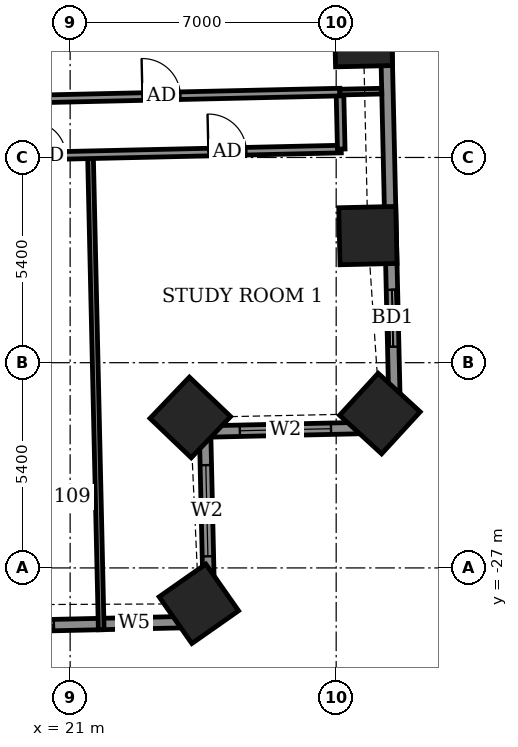
"""IFC4 building model, lengths in metres.
Left out: names, types, materials, properties, quantities, classifications, styles, units other than length and angle.
Written with IfcOpenShell. Run it as: python <this file> out.ifc"""

import sys

from ifc_helpers import new_model, si_unit, direction, frame, frame_2d, origin, origin_2d, place, context, subcontext, project, spatial, rectangle, extrude, element, fill, save


model = new_model("IFC4")
c1 = context("Model", 3, precision=1e-05, world=origin(), true_north=direction((0.0, 1.0)))
c2 = subcontext(c1, "Body", "Model", "MODEL_VIEW")
j1 = project(units=[si_unit("LENGTHUNIT", "METRE"), si_unit("PLANEANGLEUNIT", "RADIAN")], contexts=[c1])
p1 = place(None, origin())
s1 = spatial("IfcSite", under=j1, at=p1, CompositionType="ELEMENT")
p2 = place(p1, origin())
s2 = spatial("IfcBuilding", under=s1, at=p2, CompositionType="ELEMENT")
p3 = place(p2, frame((0.0, 0.0, 48.5)))
s3 = spatial("IfcBuildingStorey", under=s2, at=p3, CompositionType="ELEMENT", Elevation=48.5)
for number, where, z_axis, x_axis in (
    (1, (24.386, -27.944, -0.55), (0.0, 0.0, 1.0), (0.819, 0.574, 0.0)),
    (2, (24.162, -23.041, -0.55), (0.0, 0.0, 1.0), (0.691, 0.723, 0.0)),
    (3, (29.15, -22.938, -0.55), (0.0, 0.0, 1.0), (0.676, 0.737, 0.0)),
    (4, (28.834, -18.256, -0.55), (0.0, 0.0, 1.0), (-0.023, 1.0, 0.0)),
    (5, (28.716, -13.049, -0.55), (0.0, 0.0, 1.0), (-0.023, 1.0, 0.0)),
):
    element("IfcColumn", number, at=place(p3, frame(where, z_axis=z_axis, x_axis=x_axis)), inside=s3, PredefinedType="COLUMN", context=c2, shape_type="SweptSolid", body=[
        extrude(rectangle(XDim=1.5, YDim=1.5, at=origin_2d()), origin(), (0.0, 0.0, 1.0), 3.6),
    ])
p4 = place(p3, frame((29.549, -23.299, 0.0), z_axis=(0.0, 0.0, 1.0), x_axis=(-0.022670336976, 0.999742994885, 0.0)))
e6 = element("IfcWall", 6, at=p4, inside=s3, PredefinedType="SOLIDWALL", context=c2, shape_type="SweptSolid", body=[
    extrude(rectangle(XDim=15.529, YDim=0.3, at=frame_2d((7.765, 0.0))), origin(), (0.0, 0.0, 1.0), 3.05),
])
p5 = place(p4, frame((2.119, 0.0, 0.0)))
e7 = element("IfcOpeningElement", 7, at=p5, cuts=e6, PredefinedType="OPENING", context=c2, shape_type="SweptSolid", body=[
    extrude(rectangle(XDim=1.5, YDim=2.4, at=frame_2d((0.75, 1.2))), frame((0.0, 0.16, 0.0), z_axis=(0.0, -1.0, 0.0), x_axis=(1.0, 0.0, 0.0)), (0.0, 0.0, 1.0), 0.32),
])
p6 = place(p4, frame((11.183, 0.0, 0.9)))
e8 = element("IfcOpeningElement", 8, at=p6, cuts=e6, PredefinedType="OPENING", context=c2, shape_type="SweptSolid", body=[
    extrude(rectangle(XDim=0.9, YDim=1.5, at=frame_2d((0.45, 0.75))), frame((0.0, 0.16, 0.0), z_axis=(0.0, -1.0, 0.0), x_axis=(1.0, 0.0, 0.0)), (0.0, 0.0, 1.0), 0.32),
])
p7 = place(p4, frame((13.087, 0.0, 0.9)))
e9 = element("IfcOpeningElement", 9, at=p7, cuts=e6, PredefinedType="OPENING", context=c2, shape_type="SweptSolid", body=[
    extrude(rectangle(XDim=1.2, YDim=1.5, at=frame_2d((0.6, 0.75))), frame((0.0, 0.16, 0.0), z_axis=(0.0, -1.0, 0.0), x_axis=(1.0, 0.0, 0.0)), (0.0, 0.0, 1.0), 0.32),
])
p8 = place(p3, frame((-27.423, -29.593, 0.0), z_axis=(0.0, 0.0, 1.0), x_axis=(0.999742563204, 0.022689365739, 0.0)))
e10 = element("IfcWall", 10, at=p8, inside=s3, PredefinedType="SOLIDWALL", context=c2, shape_type="SweptSolid", body=[
    extrude(rectangle(XDim=52.101, YDim=0.3, at=frame_2d((26.05, 0.0))), origin(), (0.0, 0.0, 1.0), 3.05),
])
p9 = place(p8, frame((3.162, 0.0, 0.0)))
e11 = element("IfcOpeningElement", 11, at=p9, cuts=e10, PredefinedType="OPENING", context=c2, shape_type="SweptSolid", body=[
    extrude(rectangle(XDim=1.5, YDim=2.4, at=frame_2d((0.75, 1.2))), frame((0.0, 0.16, 0.0), z_axis=(0.0, -1.0, 0.0), x_axis=(1.0, 0.0, 0.0)), (0.0, 0.0, 1.0), 0.32),
])
p10 = place(p8, frame((9.168, 0.0, 0.0)))
e12 = element("IfcOpeningElement", 12, at=p10, cuts=e10, PredefinedType="OPENING", context=c2, shape_type="SweptSolid", body=[
    extrude(rectangle(XDim=1.5, YDim=2.4, at=frame_2d((0.75, 1.2))), frame((0.0, 0.16, 0.0), z_axis=(0.0, -1.0, 0.0), x_axis=(1.0, 0.0, 0.0)), (0.0, 0.0, 1.0), 0.32),
])
p11 = place(p8, frame((12.411, 0.0, 0.0)))
e13 = element("IfcOpeningElement", 13, at=p11, cuts=e10, PredefinedType="OPENING", context=c2, shape_type="SweptSolid", body=[
    extrude(rectangle(XDim=1.5, YDim=2.4, at=frame_2d((0.75, 1.2))), frame((0.0, 0.16, 0.0), z_axis=(0.0, -1.0, 0.0), x_axis=(1.0, 0.0, 0.0)), (0.0, 0.0, 1.0), 0.32),
])
p12 = place(p8, frame((18.275, 0.0, 0.0)))
e14 = element("IfcOpeningElement", 14, at=p12, cuts=e10, PredefinedType="OPENING", context=c2, shape_type="SweptSolid", body=[
    extrude(rectangle(XDim=1.5, YDim=2.4, at=frame_2d((0.75, 1.2))), frame((0.0, 0.16, 0.0), z_axis=(0.0, -1.0, 0.0), x_axis=(1.0, 0.0, 0.0)), (0.0, 0.0, 1.0), 0.32),
])
p13 = place(p8, frame((23.603, 0.0, 0.0)))
e15 = element("IfcOpeningElement", 15, at=p13, cuts=e10, PredefinedType="OPENING", context=c2, shape_type="SweptSolid", body=[
    extrude(rectangle(XDim=1.5, YDim=2.4, at=frame_2d((0.75, 1.2))), frame((0.0, 0.16, 0.0), z_axis=(0.0, -1.0, 0.0), x_axis=(1.0, 0.0, 0.0)), (0.0, 0.0, 1.0), 0.32),
])
p14 = place(p8, frame((26.846, 0.0, 0.0)))
e16 = element("IfcOpeningElement", 16, at=p14, cuts=e10, PredefinedType="OPENING", context=c2, shape_type="SweptSolid", body=[
    extrude(rectangle(XDim=1.5, YDim=2.4, at=frame_2d((0.75, 1.2))), frame((0.0, 0.16, 0.0), z_axis=(0.0, -1.0, 0.0), x_axis=(1.0, 0.0, 0.0)), (0.0, 0.0, 1.0), 0.32),
])
p15 = place(p8, frame((31.975, 0.0, 0.0)))
e17 = element("IfcOpeningElement", 17, at=p15, cuts=e10, PredefinedType="OPENING", context=c2, shape_type="SweptSolid", body=[
    extrude(rectangle(XDim=1.5, YDim=2.4, at=frame_2d((0.75, 1.2))), frame((0.0, 0.16, 0.0), z_axis=(0.0, -1.0, 0.0), x_axis=(1.0, 0.0, 0.0)), (0.0, 0.0, 1.0), 0.32),
])
p16 = place(p8, frame((38.214, 0.0, 0.0)))
e18 = element("IfcOpeningElement", 18, at=p16, cuts=e10, PredefinedType="OPENING", context=c2, shape_type="SweptSolid", body=[
    extrude(rectangle(XDim=1.5, YDim=2.4, at=frame_2d((0.75, 1.2))), frame((0.0, 0.16, 0.0), z_axis=(0.0, -1.0, 0.0), x_axis=(1.0, 0.0, 0.0)), (0.0, 0.0, 1.0), 0.32),
])
p17 = place(p8, frame((41.457, 0.0, 0.0)))
e19 = element("IfcOpeningElement", 19, at=p17, cuts=e10, PredefinedType="OPENING", context=c2, shape_type="SweptSolid", body=[
    extrude(rectangle(XDim=1.5, YDim=2.4, at=frame_2d((0.75, 1.2))), frame((0.0, 0.16, 0.0), z_axis=(0.0, -1.0, 0.0), x_axis=(1.0, 0.0, 0.0)), (0.0, 0.0, 1.0), 0.32),
])
p18 = place(p8, frame((46.507, 0.0, 0.0)))
e20 = element("IfcOpeningElement", 20, at=p18, cuts=e10, PredefinedType="OPENING", context=c2, shape_type="SweptSolid", body=[
    extrude(rectangle(XDim=1.5, YDim=2.4, at=frame_2d((0.75, 1.2))), frame((0.0, 0.16, 0.0), z_axis=(0.0, -1.0, 0.0), x_axis=(1.0, 0.0, 0.0)), (0.0, 0.0, 1.0), 0.32),
])
p19 = place(p8, frame((49.671, 0.0, 0.9)))
e21 = element("IfcOpeningElement", 21, at=p19, cuts=e10, PredefinedType="OPENING", context=c2, shape_type="SweptSolid", body=[
    extrude(rectangle(XDim=0.9, YDim=1.5, at=frame_2d((0.45, 0.75))), frame((0.0, 0.16, 0.0), z_axis=(0.0, -1.0, 0.0), x_axis=(1.0, 0.0, 0.0)), (0.0, 0.0, 1.0), 0.32),
])
p20 = place(p3, frame((24.664, -28.411, 0.0), z_axis=(0.0, 0.0, 1.0), x_axis=(-0.022802372469, 0.999739992103, 0.0)))
e22 = element("IfcWall", 22, at=p20, inside=s3, PredefinedType="SOLIDWALL", context=c2, shape_type="SweptSolid", body=[
    extrude(rectangle(XDim=5.0, YDim=0.3, at=frame_2d((2.5, 0.0))), origin(), (0.0, 0.0, 1.0), 2.55),
])
p21 = place(p20, frame((1.717, 0.0, 0.9)))
e23 = element("IfcOpeningElement", 23, at=p21, cuts=e22, PredefinedType="OPENING", context=c2, shape_type="SweptSolid", body=[
    extrude(rectangle(XDim=2.4, YDim=1.5, at=frame_2d((1.2, 0.75))), frame((0.0, 0.16, 0.0), z_axis=(0.0, -1.0, 0.0), x_axis=(1.0, 0.0, 0.0)), (0.0, 0.0, 1.0), 0.32),
])
p22 = place(p3, frame((24.55, -23.412, 0.0), z_axis=(0.0, 0.0, 1.0), x_axis=(0.999744450377, 0.022606059803, 0.0)))
e24 = element("IfcWall", 24, at=p22, inside=s3, PredefinedType="SOLIDWALL", context=c2, shape_type="SweptSolid", body=[
    extrude(rectangle(XDim=5.0, YDim=0.3, at=frame_2d((2.5, 0.0))), origin(), (0.0, 0.0, 1.0), 3.05),
])
p23 = place(p22, frame((0.915, 0.0, 0.9)))
e25 = element("IfcOpeningElement", 25, at=p23, cuts=e24, PredefinedType="OPENING", context=c2, shape_type="SweptSolid", body=[
    extrude(rectangle(XDim=2.4, YDim=1.5, at=frame_2d((1.2, 0.75))), frame((0.0, 0.16, 0.0), z_axis=(0.0, -1.0, 0.0), x_axis=(1.0, 0.0, 0.0)), (0.0, 0.0, 1.0), 0.32),
])
p24 = place(p3, frame((30.832, -15.918, 0.0), z_axis=(0.0, 0.0, 1.0), x_axis=(-0.022828630714, 0.999739392852, 0.0)))
e26 = element("IfcWall", 26, at=p24, inside=s3, PredefinedType="USERDEFINED", context=c2, shape_type="SweptSolid", body=[
    extrude(rectangle(XDim=6.0, YDim=0.55, at=frame_2d((3.0, 0.0))), origin(), (0.0, 0.0, 1.0), 0.8),
])
p25 = place(p3, frame((19.048, -29.988, 0.0), z_axis=(0.0, 0.0, 1.0), x_axis=(0.999744436995, 0.02260665162, 0.0)))
e27 = element("IfcWall", 27, at=p25, inside=s3, PredefinedType="USERDEFINED", context=c2, shape_type="SweptSolid", body=[
    extrude(rectangle(XDim=5.799, YDim=0.55, at=frame_2d((2.9, 0.0))), origin(), (0.0, 0.0, 1.0), 0.8),
])
p26 = place(p3, frame((21.818, -28.626, 0.0), z_axis=(0.0, 0.0, 1.0), x_axis=(-0.022661475803, 0.999743195783, 0.0)))
e28 = element("IfcWall", 28, at=p26, inside=s3, PredefinedType="PARTITIONING", context=c2, shape_type="SweptSolid", body=[
    extrude(rectangle(XDim=12.4, YDim=0.15, at=frame_2d((6.2, 0.0))), origin(), (0.0, 0.0, 1.0), 2.55),
])
p27 = place(p3, frame((-30.652, -17.313, 0.0), z_axis=(0.0, 0.0, 1.0), x_axis=(0.999742623764, 0.02268669719, 0.0)))
e29 = element("IfcWall", 29, at=p27, inside=s3, PredefinedType="PARTITIONING", context=c2, shape_type="SweptSolid", body=[
    extrude(rectangle(XDim=58.8, YDim=0.2, at=frame_2d((29.4, 0.0))), origin(), (0.0, 0.0, 1.0), 3.05),
])
p28 = place(p27, frame((2.6, 0.0, 0.0)))
e30 = element("IfcOpeningElement", 30, at=p28, cuts=e29, PredefinedType="OPENING", context=c2, shape_type="SweptSolid", body=[
    extrude(rectangle(XDim=1.0, YDim=2.1, at=frame_2d((0.5, 1.05))), frame((0.0, 0.11, 0.0), z_axis=(0.0, -1.0, 0.0), x_axis=(1.0, 0.0, 0.0)), (0.0, 0.0, 1.0), 0.22),
])
p29 = place(p27, frame((8.45, 0.0, 0.0)))
e31 = element("IfcOpeningElement", 31, at=p29, cuts=e29, PredefinedType="OPENING", context=c2, shape_type="SweptSolid", body=[
    extrude(rectangle(XDim=0.9, YDim=2.1, at=frame_2d((0.45, 1.05))), frame((0.0, 0.11, 0.0), z_axis=(0.0, -1.0, 0.0), x_axis=(1.0, 0.0, 0.0)), (0.0, 0.0, 1.0), 0.22),
])
p30 = place(p27, frame((13.325, 0.0, 0.0)))
e32 = element("IfcOpeningElement", 32, at=p30, cuts=e29, PredefinedType="OPENING", context=c2, shape_type="SweptSolid", body=[
    extrude(rectangle(XDim=0.9, YDim=2.1, at=frame_2d((0.45, 1.05))), frame((0.0, 0.11, 0.0), z_axis=(0.0, -1.0, 0.0), x_axis=(1.0, 0.0, 0.0)), (0.0, 0.0, 1.0), 0.22),
])
p31 = place(p27, frame((15.7, 0.0, 0.0)))
e33 = element("IfcOpeningElement", 33, at=p31, cuts=e29, PredefinedType="OPENING", context=c2, shape_type="SweptSolid", body=[
    extrude(rectangle(XDim=0.9, YDim=2.1, at=frame_2d((0.45, 1.05))), frame((0.0, 0.11, 0.0), z_axis=(0.0, -1.0, 0.0), x_axis=(1.0, 0.0, 0.0)), (0.0, 0.0, 1.0), 0.22),
])
p32 = place(p27, frame((22.725, 0.0, 0.0)))
e34 = element("IfcOpeningElement", 34, at=p32, cuts=e29, PredefinedType="OPENING", context=c2, shape_type="SweptSolid", body=[
    extrude(rectangle(XDim=0.9, YDim=2.1, at=frame_2d((0.45, 1.05))), frame((0.0, 0.11, 0.0), z_axis=(0.0, -1.0, 0.0), x_axis=(1.0, 0.0, 0.0)), (0.0, 0.0, 1.0), 0.22),
])
p33 = place(p27, frame((24.875, 0.0, 0.0)))
e35 = element("IfcOpeningElement", 35, at=p33, cuts=e29, PredefinedType="OPENING", context=c2, shape_type="SweptSolid", body=[
    extrude(rectangle(XDim=0.9, YDim=2.1, at=frame_2d((0.45, 1.05))), frame((0.0, 0.11, 0.0), z_axis=(0.0, -1.0, 0.0), x_axis=(1.0, 0.0, 0.0)), (0.0, 0.0, 1.0), 0.22),
])
p34 = place(p27, frame((31.825, 0.0, 0.0)))
e36 = element("IfcOpeningElement", 36, at=p34, cuts=e29, PredefinedType="OPENING", context=c2, shape_type="SweptSolid", body=[
    extrude(rectangle(XDim=0.9, YDim=2.1, at=frame_2d((0.45, 1.05))), frame((0.0, 0.11, 0.0), z_axis=(0.0, -1.0, 0.0), x_axis=(1.0, 0.0, 0.0)), (0.0, 0.0, 1.0), 0.22),
])
p35 = place(p27, frame((34.025, 0.0, 0.0)))
e37 = element("IfcOpeningElement", 37, at=p35, cuts=e29, PredefinedType="OPENING", context=c2, shape_type="SweptSolid", body=[
    extrude(rectangle(XDim=0.9, YDim=2.1, at=frame_2d((0.45, 1.05))), frame((0.0, 0.11, 0.0), z_axis=(0.0, -1.0, 0.0), x_axis=(1.0, 0.0, 0.0)), (0.0, 0.0, 1.0), 0.22),
])
p36 = place(p27, frame((41.325, 0.0, 0.0)))
e38 = element("IfcOpeningElement", 38, at=p36, cuts=e29, PredefinedType="OPENING", context=c2, shape_type="SweptSolid", body=[
    extrude(rectangle(XDim=0.9, YDim=2.1, at=frame_2d((0.45, 1.05))), frame((0.0, 0.11, 0.0), z_axis=(0.0, -1.0, 0.0), x_axis=(1.0, 0.0, 0.0)), (0.0, 0.0, 1.0), 0.22),
])
p37 = place(p27, frame((43.7, 0.0, 0.0)))
e39 = element("IfcOpeningElement", 39, at=p37, cuts=e29, PredefinedType="OPENING", context=c2, shape_type="SweptSolid", body=[
    extrude(rectangle(XDim=0.9, YDim=2.1, at=frame_2d((0.45, 1.05))), frame((0.0, 0.11, 0.0), z_axis=(0.0, -1.0, 0.0), x_axis=(1.0, 0.0, 0.0)), (0.0, 0.0, 1.0), 0.22),
])
p38 = place(p27, frame((50.65, 0.0, 0.0)))
e40 = element("IfcOpeningElement", 40, at=p38, cuts=e29, PredefinedType="OPENING", context=c2, shape_type="SweptSolid", body=[
    extrude(rectangle(XDim=0.9, YDim=2.1, at=frame_2d((0.45, 1.05))), frame((0.0, 0.11, 0.0), z_axis=(0.0, -1.0, 0.0), x_axis=(1.0, 0.0, 0.0)), (0.0, 0.0, 1.0), 0.22),
])
p39 = place(p27, frame((55.304, 0.0, 0.0)))
e41 = element("IfcOpeningElement", 41, at=p39, cuts=e29, PredefinedType="OPENING", context=c2, shape_type="SweptSolid", body=[
    extrude(rectangle(XDim=1.0, YDim=2.1, at=frame_2d((0.5, 1.05))), frame((0.0, 0.11, 0.0), z_axis=(0.0, -1.0, 0.0), x_axis=(1.0, 0.0, 0.0)), (0.0, 0.0, 1.0), 0.22),
])
p40 = place(p3, frame((28.133, -15.979, 0.0), z_axis=(0.0, 0.0, 1.0), x_axis=(-0.022632637625, 0.99974384905, 0.0)))
e42 = element("IfcWall", 42, at=p40, inside=s3, PredefinedType="PARTITIONING", context=c2, shape_type="SweptSolid", body=[
    extrude(rectangle(XDim=1.5, YDim=0.2, at=frame_2d((0.75, 0.0))), origin(), (0.0, 0.0, 1.0), 3.05),
])
p41 = place(p3, frame((17.306, -14.724, 0.0), z_axis=(0.0, 0.0, 1.0), x_axis=(0.999744269809, 0.022614043969, 0.0)))
e43 = element("IfcWall", 43, at=p41, inside=s3, PredefinedType="PARTITIONING", context=c2, shape_type="SweptSolid", body=[
    extrude(rectangle(XDim=10.796, YDim=0.2, at=frame_2d((5.398, 0.0))), origin(), (0.0, 0.0, 1.0), 3.05),
])
p42 = place(p41, frame((5.598, 0.0, 0.0)))
e44 = element("IfcOpeningElement", 44, at=p42, cuts=e43, PredefinedType="OPENING", context=c2, shape_type="SweptSolid", body=[
    extrude(rectangle(XDim=1.0, YDim=2.1, at=frame_2d((0.5, 1.05))), frame((0.0, 0.11, 0.0), z_axis=(0.0, -1.0, 0.0), x_axis=(1.0, 0.0, 0.0)), (0.0, 0.0, 1.0), 0.22),
])
p43 = place(p3, frame((28.095, -14.48, 0.0), z_axis=(0.0, 0.0, 1.0), x_axis=(0.999745251335, 0.022570609924, 0.0)))
e45 = element("IfcWall", 45, at=p43, inside=s3, PredefinedType="PARTITIONING", context=c2, shape_type="SweptSolid", body=[
    extrude(rectangle(XDim=1.103, YDim=0.15, at=frame_2d((0.552, 0.0))), origin(), (0.0, 0.0, 1.0), 2.55),
])
p44 = place(p5, origin())
e46 = element("IfcDoor", 46, at=p44, inside=s3, OperationType="SLIDING_TO_LEFT", PredefinedType="DOOR", context=c2, shape_type="SweptSolid", body=[
    extrude(rectangle(XDim=1.5, YDim=2.4, at=frame_2d((0.75, 1.2))), frame((0.0, 0.025, 0.0), z_axis=(0.0, -1.0, 0.0), x_axis=(1.0, 0.0, 0.0)), (0.0, 0.0, 1.0), 0.05),
])
fill(e7, e46)
p45 = place(p18, origin())
e47 = element("IfcDoor", 47, at=p45, inside=s3, OperationType="SLIDING_TO_LEFT", PredefinedType="DOOR", context=c2, shape_type="SweptSolid", body=[
    extrude(rectangle(XDim=1.5, YDim=2.4, at=frame_2d((0.75, 1.2))), frame((0.0, 0.025, 0.0), z_axis=(0.0, -1.0, 0.0), x_axis=(1.0, 0.0, 0.0)), (0.0, 0.0, 1.0), 0.05),
])
fill(e20, e47)
p46 = place(p19, origin())
e48 = element("IfcWindow", 48, at=p46, inside=s3, PartitioningType="SINGLE_PANEL", PredefinedType="WINDOW", context=c2, shape_type="SweptSolid", body=[
    extrude(rectangle(XDim=0.9, YDim=1.5, at=frame_2d((0.45, 0.75))), frame((0.0, 0.03, 0.0), z_axis=(0.0, -1.0, 0.0), x_axis=(1.0, 0.0, 0.0)), (0.0, 0.0, 1.0), 0.06),
])
fill(e21, e48)
p47 = place(p21, origin())
e49 = element("IfcWindow", 49, at=p47, inside=s3, PartitioningType="DOUBLE_PANEL_VERTICAL", PredefinedType="WINDOW", context=c2, shape_type="SweptSolid", body=[
    extrude(rectangle(XDim=2.4, YDim=1.5, at=frame_2d((1.2, 0.75))), frame((0.0, 0.03, 0.0), z_axis=(0.0, -1.0, 0.0), x_axis=(1.0, 0.0, 0.0)), (0.0, 0.0, 1.0), 0.06),
])
fill(e23, e49)
p48 = place(p23, origin())
e50 = element("IfcWindow", 50, at=p48, inside=s3, PartitioningType="DOUBLE_PANEL_VERTICAL", PredefinedType="WINDOW", context=c2, shape_type="SweptSolid", body=[
    extrude(rectangle(XDim=2.4, YDim=1.5, at=frame_2d((1.2, 0.75))), frame((0.0, 0.03, 0.0), z_axis=(0.0, -1.0, 0.0), x_axis=(1.0, 0.0, 0.0)), (0.0, 0.0, 1.0), 0.06),
])
fill(e25, e50)
p49 = place(p38, origin())
e51 = element("IfcDoor", 51, at=p49, inside=s3, OperationType="SINGLE_SWING_LEFT", PredefinedType="DOOR", context=c2, shape_type="SweptSolid", body=[
    extrude(rectangle(XDim=0.9, YDim=2.1, at=frame_2d((0.45, 1.05))), frame((0.0, 0.025, 0.0), z_axis=(0.0, -1.0, 0.0), x_axis=(1.0, 0.0, 0.0)), (0.0, 0.0, 1.0), 0.05),
])
fill(e40, e51)
p50 = place(p39, origin())
e52 = element("IfcDoor", 52, at=p50, inside=s3, OperationType="SINGLE_SWING_RIGHT", PredefinedType="DOOR", context=c2, shape_type="SweptSolid", body=[
    extrude(rectangle(XDim=1.0, YDim=2.1, at=frame_2d((0.5, 1.05))), frame((0.0, 0.025, 0.0), z_axis=(0.0, -1.0, 0.0), x_axis=(1.0, 0.0, 0.0)), (0.0, 0.0, 1.0), 0.05),
])
fill(e41, e52)
p51 = place(p42, origin())
e53 = element("IfcDoor", 53, at=p51, inside=s3, OperationType="SINGLE_SWING_LEFT", PredefinedType="DOOR", context=c2, shape_type="SweptSolid", body=[
    extrude(rectangle(XDim=1.0, YDim=2.1, at=frame_2d((0.5, 1.05))), frame((0.0, 0.025, 0.0), z_axis=(0.0, -1.0, 0.0), x_axis=(1.0, 0.0, 0.0)), (0.0, 0.0, 1.0), 0.05),
])
fill(e44, e53)
save(model, sys.argv[1])
